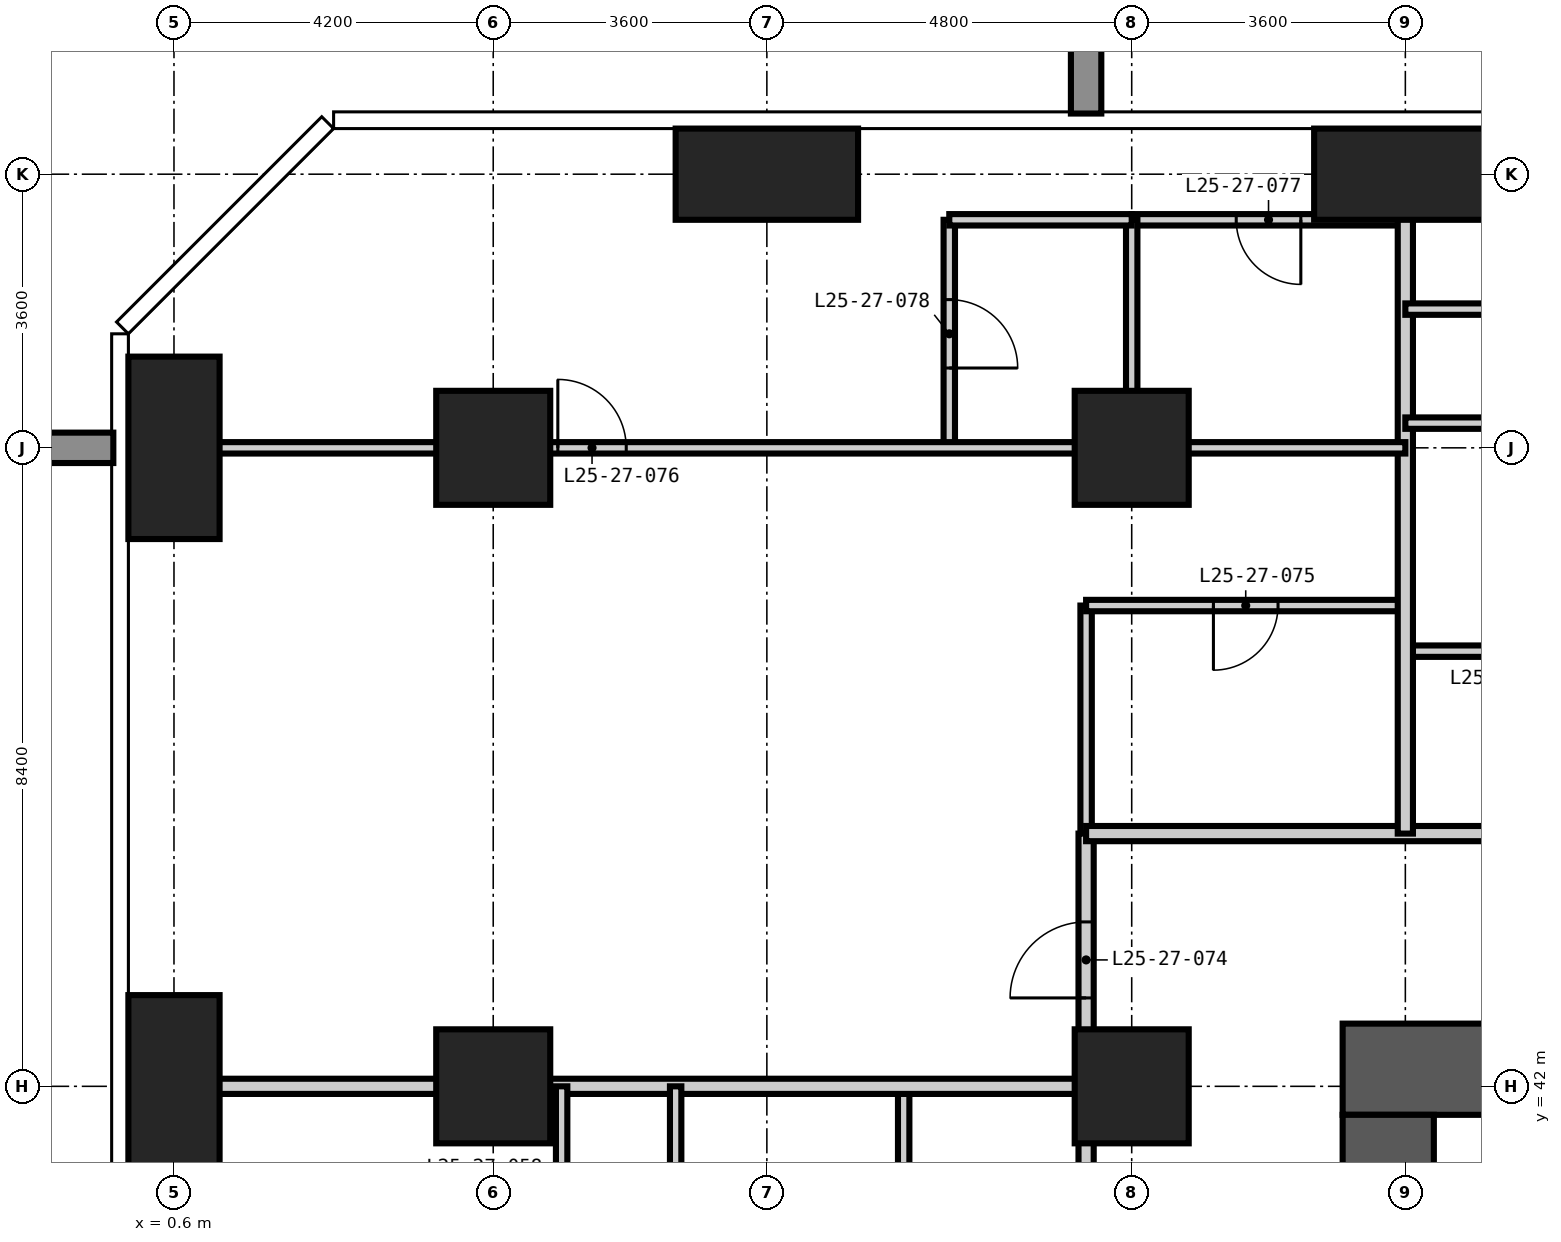
"""IFC4 building model, lengths in metres.
Left out: names, types, materials, properties, quantities, classifications, styles, units other than length and angle.
Written with IfcOpenShell. Run it as: python <this file> out.ifc"""

import sys

from ifc_helpers import new_model, si_unit, direction, frame, frame_2d, origin, origin_2d, place, context, subcontext, project, spatial, rectangle, extrude, element, fill, save


model = new_model("IFC4")
c1 = context("Model", 3, precision=1e-05, world=origin(), true_north=direction((0.0, 1.0)))
c2 = subcontext(c1, "Body", "Model", "MODEL_VIEW")
j1 = project(units=[si_unit("LENGTHUNIT", "METRE"), si_unit("PLANEANGLEUNIT", "RADIAN")], contexts=[c1])
p1 = place(None, origin())
s1 = spatial("IfcSite", under=j1, at=p1, CompositionType="ELEMENT")
p2 = place(p1, origin())
s2 = spatial("IfcBuilding", under=s1, at=p2, CompositionType="ELEMENT")
p3 = place(p2, frame((0.0, 0.0, 100.8)))
s3 = spatial("IfcBuildingStorey", under=s2, at=p3, CompositionType="ELEMENT", Elevation=100.8)
for number, where, z_axis, x_axis in (
    (1, (0.6, 42.0, -0.35), (0.0, 0.0, 1.0), (1.0, 0.0, 0.0)),
    (2, (0.6, 50.4, -0.35), (0.0, 0.0, 1.0), (1.0, 0.0, 0.0)),
):
    element("IfcColumn", number, at=place(p3, frame(where, z_axis=z_axis, x_axis=x_axis)), inside=s3, PredefinedType="COLUMN", context=c2, shape_type="SweptSolid", body=[
        extrude(rectangle(XDim=1.2, YDim=2.4, at=origin_2d()), origin(), (0.0, 0.0, 1.0), 3.6),
    ])
for number, where, z_axis, x_axis in (
    (3, (4.8, 42.0, -0.35), (0.0, 0.0, 1.0), (1.0, 0.0, 0.0)),
    (4, (4.8, 50.4, -0.35), (0.0, 0.0, 1.0), (1.0, 0.0, 0.0)),
):
    element("IfcColumn", number, at=place(p3, frame(where, z_axis=z_axis, x_axis=x_axis)), inside=s3, PredefinedType="COLUMN", context=c2, shape_type="SweptSolid", body=[
        extrude(rectangle(XDim=1.5, YDim=1.5, at=origin_2d()), origin(), (0.0, 0.0, 1.0), 3.6),
    ])
p4 = place(p3, frame((8.4, 54.0, -0.35), z_axis=(0.0, 0.0, 1.0), x_axis=(1.0, 0.0, 0.0)))
e5 = element("IfcColumn", 5, at=p4, inside=s3, PredefinedType="COLUMN", context=c2, shape_type="SweptSolid", body=[
    extrude(rectangle(XDim=2.4, YDim=1.2, at=origin_2d()), origin(), (0.0, 0.0, 1.0), 3.6),
])
for number, where, z_axis, x_axis in (
    (6, (13.2, 42.0, -0.35), (0.0, 0.0, 1.0), (1.0, 0.0, 0.0)),
    (7, (13.2, 50.4, -0.35), (0.0, 0.0, 1.0), (1.0, 0.0, 0.0)),
):
    element("IfcColumn", number, at=place(p3, frame(where, z_axis=z_axis, x_axis=x_axis)), inside=s3, PredefinedType="COLUMN", context=c2, shape_type="SweptSolid", body=[
        extrude(rectangle(XDim=1.5, YDim=1.5, at=origin_2d()), origin(), (0.0, 0.0, 1.0), 3.6),
    ])
p5 = place(p3, frame((16.8, 54.0, -0.35), z_axis=(0.0, 0.0, 1.0), x_axis=(1.0, 0.0, 0.0)))
e8 = element("IfcColumn", 8, at=p5, inside=s3, PredefinedType="COLUMN", context=c2, shape_type="SweptSolid", body=[
    extrude(rectangle(XDim=2.4, YDim=1.2, at=origin_2d()), origin(), (0.0, 0.0, 1.0), 3.6),
])
p6 = place(p3, frame((42.825, 42.225, -0.35), z_axis=(0.0, 0.0, 1.0), x_axis=(-1.0, 0.0, 0.0)))
e9 = element("IfcWall", 9, at=p6, inside=s3, PredefinedType="SHEAR", context=c2, shape_type="SweptSolid", body=[
    extrude(rectangle(XDim=26.85, YDim=1.2, at=frame_2d((13.425, 0.0))), origin(), (0.0, 0.0, 1.0), 3.6),
])
p7 = place(p6, frame((21.325, 0.0, 0.35)))
e10 = element("IfcOpeningElement", 10, at=p7, cuts=e9, PredefinedType="OPENING", context=c2, shape_type="SweptSolid", body=[
    extrude(rectangle(XDim=1.0, YDim=2.1, at=frame_2d((0.5, 1.05))), frame((0.0, 0.61, 0.0), z_axis=(0.0, -1.0, 0.0), x_axis=(1.0, 0.0, 0.0)), (0.0, 0.0, 1.0), 1.22),
])
p8 = place(p6, frame((10.725, 0.0, 0.35)))
e11 = element("IfcOpeningElement", 11, at=p8, cuts=e9, PredefinedType="OPENING", context=c2, shape_type="SweptSolid", body=[
    extrude(rectangle(XDim=1.2, YDim=2.2, at=frame_2d((0.6, 1.1))), frame((0.0, 0.61, 0.0), z_axis=(0.0, -1.0, 0.0), x_axis=(1.0, 0.0, 0.0)), (0.0, 0.0, 1.0), 1.22),
])
p9 = place(p3, frame((16.575, 41.625, -0.35), z_axis=(0.0, 0.0, 1.0), x_axis=(0.0, -1.0, 0.0)))
e12 = element("IfcWall", 12, at=p9, inside=s3, PredefinedType="SHEAR", context=c2, shape_type="SweptSolid", body=[
    extrude(rectangle(XDim=24.45, YDim=1.2, at=frame_2d((12.225, 0.0))), origin(), (0.0, 0.0, 1.0), 3.6),
])
p10 = place(p9, frame((11.325, 0.0, 0.35)))
e13 = element("IfcOpeningElement", 13, at=p10, cuts=e12, PredefinedType="OPENING", context=c2, shape_type="SweptSolid", body=[
    extrude(rectangle(XDim=1.8, YDim=2.2, at=frame_2d((0.9, 1.1))), frame((0.0, 0.61, 0.0), z_axis=(0.0, -1.0, 0.0), x_axis=(1.0, 0.0, 0.0)), (0.0, 0.0, 1.0), 1.22),
])
p11 = place(p9, frame((20.125, 0.0, 0.35)))
e14 = element("IfcOpeningElement", 14, at=p11, cuts=e12, PredefinedType="OPENING", context=c2, shape_type="SweptSolid", body=[
    extrude(rectangle(XDim=1.0, YDim=2.1, at=frame_2d((0.5, 1.05))), frame((0.0, 0.61, 0.0), z_axis=(0.0, -1.0, 0.0), x_axis=(1.0, 0.0, 0.0)), (0.0, 0.0, 1.0), 1.22),
])
p12 = place(p9, frame((5.425, 0.0, 0.35)))
e15 = element("IfcOpeningElement", 15, at=p12, cuts=e12, PredefinedType="OPENING", context=c2, shape_type="SweptSolid", body=[
    extrude(rectangle(XDim=1.0, YDim=2.1, at=frame_2d((0.5, 1.05))), frame((0.0, 0.61, 0.0), z_axis=(0.0, -1.0, 0.0), x_axis=(1.0, 0.0, 0.0)), (0.0, 0.0, 1.0), 1.22),
])
p13 = place(p3, frame((10.2, 39.0, 0.0), z_axis=(0.0, 0.0, 1.0), x_axis=(0.0, 1.0, 0.0)))
e16 = element("IfcWall", 16, at=p13, inside=s3, PredefinedType="PARTITIONING", context=c2, shape_type="SweptSolid", body=[
    extrude(rectangle(XDim=3.0, YDim=0.15, at=frame_2d((1.5, 0.0))), origin(), (0.0, 0.0, 1.0), 3.25),
])
p14 = place(p13, frame((1.075, 0.0, 0.0)))
e17 = element("IfcOpeningElement", 17, at=p14, cuts=e16, PredefinedType="OPENING", context=c2, shape_type="SweptSolid", body=[
    extrude(rectangle(XDim=0.85, YDim=2.1, at=frame_2d((0.425, 1.05))), frame((0.0, 0.085, 0.0), z_axis=(0.0, -1.0, 0.0), x_axis=(1.0, 0.0, 0.0)), (0.0, 0.0, 1.0), 0.17),
])
p15 = place(p3, frame((12.6, 45.325, 0.0), z_axis=(0.0, 0.0, 1.0), x_axis=(0.0, 1.0, 0.0)))
e18 = element("IfcWall", 18, at=p15, inside=s3, PredefinedType="PARTITIONING", context=c2, shape_type="SweptSolid", body=[
    extrude(rectangle(XDim=3.0, YDim=0.15, at=frame_2d((1.5, 0.0))), origin(), (0.0, 0.0, 1.0), 3.25),
])
p16 = place(p3, frame((16.8, 47.725, 0.0), z_axis=(0.0, 0.0, 1.0), x_axis=(1.0, 0.0, 0.0)))
e19 = element("IfcWall", 19, at=p16, inside=s3, PredefinedType="PARTITIONING", context=c2, shape_type="SweptSolid", body=[
    extrude(rectangle(XDim=3.0, YDim=0.15, at=frame_2d((1.5, 0.0))), origin(), (0.0, 0.0, 1.0), 3.25),
])
p17 = place(p16, frame((1.075, 0.0, 0.0)))
e20 = element("IfcOpeningElement", 20, at=p17, cuts=e19, PredefinedType="OPENING", context=c2, shape_type="SweptSolid", body=[
    extrude(rectangle(XDim=0.85, YDim=2.1, at=frame_2d((0.425, 1.05))), frame((0.0, 0.085, 0.0), z_axis=(0.0, -1.0, 0.0), x_axis=(1.0, 0.0, 0.0)), (0.0, 0.0, 1.0), 0.17),
])
p18 = place(p3, frame((12.6, 48.325, 0.0), z_axis=(0.0, 0.0, 1.0), x_axis=(1.0, 0.0, 0.0)))
e21 = element("IfcWall", 21, at=p18, inside=s3, PredefinedType="PARTITIONING", context=c2, shape_type="SweptSolid", body=[
    extrude(rectangle(XDim=4.2, YDim=0.15, at=frame_2d((2.1, 0.0))), origin(), (0.0, 0.0, 1.0), 3.25),
])
p19 = place(p18, frame((1.675, 0.0, 0.0)))
e22 = element("IfcOpeningElement", 22, at=p19, cuts=e21, PredefinedType="OPENING", context=c2, shape_type="SweptSolid", body=[
    extrude(rectangle(XDim=0.85, YDim=2.1, at=frame_2d((0.425, 1.05))), frame((0.0, 0.085, 0.0), z_axis=(0.0, -1.0, 0.0), x_axis=(1.0, 0.0, 0.0)), (0.0, 0.0, 1.0), 0.17),
])
p20 = place(p3, frame((13.2, 53.4, 0.0), z_axis=(0.0, 0.0, 1.0), x_axis=(1.0, 0.0, 0.0)))
e23 = element("IfcWall", 23, at=p20, inside=s3, PredefinedType="PARTITIONING", context=c2, shape_type="SweptSolid", body=[
    extrude(rectangle(XDim=3.6, YDim=0.15, at=frame_2d((1.8, 0.0))), origin(), (0.0, 0.0, 1.0), 3.25),
])
p21 = place(p20, frame((1.375, 0.0, 0.0)))
e24 = element("IfcOpeningElement", 24, at=p21, cuts=e23, PredefinedType="OPENING", context=c2, shape_type="SweptSolid", body=[
    extrude(rectangle(XDim=0.85, YDim=2.1, at=frame_2d((0.425, 1.05))), frame((0.0, 0.085, 0.0), z_axis=(0.0, -1.0, 0.0), x_axis=(1.0, 0.0, 0.0)), (0.0, 0.0, 1.0), 0.17),
])
p22 = place(p3, frame((12.6, 14.075, 0.0), z_axis=(0.0, 0.0, 1.0), x_axis=(0.0, 1.0, 0.0)))
e25 = element("IfcWall", 25, at=p22, inside=s3, PredefinedType="PARTITIONING", context=c2, shape_type="SweptSolid", body=[
    extrude(rectangle(XDim=31.25, YDim=0.2, at=frame_2d((15.625, 0.0))), origin(), (0.0, 0.0, 1.0), 3.25),
])
p23 = place(p22, frame((5.225, 0.0, 0.0)))
e26 = element("IfcOpeningElement", 26, at=p23, cuts=e25, PredefinedType="OPENING", context=c2, shape_type="SweptSolid", body=[
    extrude(rectangle(XDim=1.0, YDim=2.2, at=frame_2d((0.5, 1.1))), frame((0.0, 0.11, 0.0), z_axis=(0.0, -1.0, 0.0), x_axis=(1.0, 0.0, 0.0)), (0.0, 0.0, 1.0), 0.22),
])
p24 = place(p22, frame((13.625, 0.0, 0.0)))
e27 = element("IfcOpeningElement", 27, at=p24, cuts=e25, PredefinedType="OPENING", context=c2, shape_type="SweptSolid", body=[
    extrude(rectangle(XDim=1.0, YDim=2.2, at=frame_2d((0.5, 1.1))), frame((0.0, 0.11, 0.0), z_axis=(0.0, -1.0, 0.0), x_axis=(1.0, 0.0, 0.0)), (0.0, 0.0, 1.0), 0.22),
])
p25 = place(p22, frame((22.025, 0.0, 0.0)))
e28 = element("IfcOpeningElement", 28, at=p25, cuts=e25, PredefinedType="OPENING", context=c2, shape_type="SweptSolid", body=[
    extrude(rectangle(XDim=1.0, YDim=2.2, at=frame_2d((0.5, 1.1))), frame((0.0, 0.11, 0.0), z_axis=(0.0, -1.0, 0.0), x_axis=(1.0, 0.0, 0.0)), (0.0, 0.0, 1.0), 0.22),
])
p26 = place(p22, frame((0.863, 0.0, 0.0)))
e29 = element("IfcOpeningElement", 29, at=p26, cuts=e25, PredefinedType="OPENING", context=c2, shape_type="SweptSolid", body=[
    extrude(rectangle(XDim=1.0, YDim=2.2, at=frame_2d((0.5, 1.1))), frame((0.0, 0.11, 0.0), z_axis=(0.0, -1.0, 0.0), x_axis=(1.0, 0.0, 0.0)), (0.0, 0.0, 1.0), 0.22),
])
p27 = place(p22, frame((29.088, 0.0, 0.0)))
e30 = element("IfcOpeningElement", 30, at=p27, cuts=e25, PredefinedType="OPENING", context=c2, shape_type="SweptSolid", body=[
    extrude(rectangle(XDim=1.0, YDim=2.2, at=frame_2d((0.5, 1.1))), frame((0.0, 0.11, 0.0), z_axis=(0.0, -1.0, 0.0), x_axis=(1.0, 0.0, 0.0)), (0.0, 0.0, 1.0), 0.22),
])
p28 = place(p3, frame((12.6, 45.325, 0.0), z_axis=(0.0, 0.0, 1.0), x_axis=(1.0, 0.0, 0.0)))
e31 = element("IfcWall", 31, at=p28, inside=s3, PredefinedType="PARTITIONING", context=c2, shape_type="SweptSolid", body=[
    extrude(rectangle(XDim=33.325, YDim=0.2, at=frame_2d((16.663, 0.0))), origin(), (0.0, 0.0, 1.0), 3.25),
])
p29 = place(p28, frame((7.9, 0.0, 0.0)))
e32 = element("IfcOpeningElement", 32, at=p29, cuts=e31, PredefinedType="OPENING", context=c2, shape_type="SweptSolid", body=[
    extrude(rectangle(XDim=1.0, YDim=2.2, at=frame_2d((0.5, 1.1))), frame((0.0, 0.11, 0.0), z_axis=(0.0, -1.0, 0.0), x_axis=(1.0, 0.0, 0.0)), (0.0, 0.0, 1.0), 0.22),
])
p30 = place(p28, frame((16.3, 0.0, 0.0)))
e33 = element("IfcOpeningElement", 33, at=p30, cuts=e31, PredefinedType="OPENING", context=c2, shape_type="SweptSolid", body=[
    extrude(rectangle(XDim=1.0, YDim=2.2, at=frame_2d((0.5, 1.1))), frame((0.0, 0.11, 0.0), z_axis=(0.0, -1.0, 0.0), x_axis=(1.0, 0.0, 0.0)), (0.0, 0.0, 1.0), 0.22),
])
p31 = place(p28, frame((24.7, 0.0, 0.0)))
e34 = element("IfcOpeningElement", 34, at=p31, cuts=e31, PredefinedType="OPENING", context=c2, shape_type="SweptSolid", body=[
    extrude(rectangle(XDim=1.0, YDim=2.2, at=frame_2d((0.5, 1.1))), frame((0.0, 0.11, 0.0), z_axis=(0.0, -1.0, 0.0), x_axis=(1.0, 0.0, 0.0)), (0.0, 0.0, 1.0), 0.22),
])
p32 = place(p3, frame((16.8, 45.325, 0.0), z_axis=(0.0, 0.0, 1.0), x_axis=(0.0, 1.0, 0.0)))
e35 = element("IfcWall", 35, at=p32, inside=s3, PredefinedType="PARTITIONING", context=c2, shape_type="SweptSolid", body=[
    extrude(rectangle(XDim=9.293, YDim=0.2, at=frame_2d((4.646, 0.0))), origin(), (0.0, 0.0, 1.0), 3.25),
])
p33 = place(p3, frame((-0.018, 42.0, 0.0), z_axis=(0.0, 0.0, 1.0), x_axis=(1.0, 0.0, 0.0)))
e36 = element("IfcWall", 36, at=p33, inside=s3, PredefinedType="PARTITIONING", context=c2, shape_type="SweptSolid", body=[
    extrude(rectangle(XDim=12.618, YDim=0.2, at=frame_2d((6.309, 0.0))), origin(), (0.0, 0.0, 1.0), 3.25),
])
p34 = place(p3, frame((5.7, 39.0, 0.0), z_axis=(0.0, 0.0, 1.0), x_axis=(0.0, 1.0, 0.0)))
e37 = element("IfcWall", 37, at=p34, inside=s3, PredefinedType="PARTITIONING", context=c2, shape_type="SweptSolid", body=[
    extrude(rectangle(XDim=3.0, YDim=0.15, at=frame_2d((1.5, 0.0))), origin(), (0.0, 0.0, 1.0), 3.25),
])
p35 = place(p34, frame((1.05, 0.0, 0.0)))
e38 = element("IfcOpeningElement", 38, at=p35, cuts=e37, PredefinedType="OPENING", context=c2, shape_type="SweptSolid", body=[
    extrude(rectangle(XDim=0.9, YDim=2.1, at=frame_2d((0.45, 1.05))), frame((0.0, 0.085, 0.0), z_axis=(0.0, -1.0, 0.0), x_axis=(1.0, 0.0, 0.0)), (0.0, 0.0, 1.0), 0.17),
])
p36 = place(p3, frame((7.2, 39.0, 0.0), z_axis=(0.0, 0.0, 1.0), x_axis=(0.0, 1.0, 0.0)))
e39 = element("IfcWall", 39, at=p36, inside=s3, PredefinedType="PARTITIONING", context=c2, shape_type="SweptSolid", body=[
    extrude(rectangle(XDim=3.0, YDim=0.15, at=frame_2d((1.5, 0.0))), origin(), (0.0, 0.0, 1.0), 3.25),
])
p37 = place(p3, frame((10.8, 50.4, 0.0), z_axis=(0.0, 0.0, 1.0), x_axis=(0.0, 1.0, 0.0)))
e40 = element("IfcWall", 40, at=p37, inside=s3, PredefinedType="PARTITIONING", context=c2, shape_type="SweptSolid", body=[
    extrude(rectangle(XDim=3.0, YDim=0.15, at=frame_2d((1.5, 0.0))), origin(), (0.0, 0.0, 1.0), 3.25),
])
p38 = place(p37, frame((1.05, 0.0, 0.0)))
e41 = element("IfcOpeningElement", 41, at=p38, cuts=e40, PredefinedType="OPENING", context=c2, shape_type="SweptSolid", body=[
    extrude(rectangle(XDim=0.9, YDim=2.1, at=frame_2d((0.45, 1.05))), frame((0.0, 0.085, 0.0), z_axis=(0.0, -1.0, 0.0), x_axis=(1.0, 0.0, 0.0)), (0.0, 0.0, 1.0), 0.17),
])
p39 = place(p3, frame((13.2, 50.4, 0.0), z_axis=(0.0, 0.0, 1.0), x_axis=(0.0, 1.0, 0.0)))
e42 = element("IfcWall", 42, at=p39, inside=s3, PredefinedType="PARTITIONING", context=c2, shape_type="SweptSolid", body=[
    extrude(rectangle(XDim=3.0, YDim=0.15, at=frame_2d((1.5, 0.0))), origin(), (0.0, 0.0, 1.0), 3.25),
])
p40 = place(p3, frame((-0.018, 50.4, 0.0), z_axis=(0.0, 0.0, 1.0), x_axis=(1.0, 0.0, 0.0)))
e43 = element("IfcWall", 43, at=p40, inside=s3, PredefinedType="PARTITIONING", context=c2, shape_type="SweptSolid", body=[
    extrude(rectangle(XDim=16.818, YDim=0.15, at=frame_2d((8.409, 0.0))), origin(), (0.0, 0.0, 1.0), 3.25),
])
p41 = place(p40, frame((5.668, 0.0, 0.0)))
e44 = element("IfcOpeningElement", 44, at=p41, cuts=e43, PredefinedType="OPENING", context=c2, shape_type="SweptSolid", body=[
    extrude(rectangle(XDim=0.9, YDim=2.1, at=frame_2d((0.45, 1.05))), frame((0.0, 0.085, 0.0), z_axis=(0.0, -1.0, 0.0), x_axis=(1.0, 0.0, 0.0)), (0.0, 0.0, 1.0), 0.17),
])
p42 = place(p3, frame((16.8, 50.725, 0.0), z_axis=(0.0, 0.0, 1.0), x_axis=(1.0, 0.0, 0.0)))
e45 = element("IfcWall", 45, at=p42, inside=s3, PredefinedType="PARTITIONING", context=c2, shape_type="SweptSolid", body=[
    extrude(rectangle(XDim=3.0, YDim=0.15, at=frame_2d((1.5, 0.0))), origin(), (0.0, 0.0, 1.0), 3.25),
])
p43 = place(p3, frame((16.8, 52.225, 0.0), z_axis=(0.0, 0.0, 1.0), x_axis=(1.0, 0.0, 0.0)))
e46 = element("IfcWall", 46, at=p43, inside=s3, PredefinedType="PARTITIONING", context=c2, shape_type="SweptSolid", body=[
    extrude(rectangle(XDim=3.0, YDim=0.15, at=frame_2d((1.5, 0.0))), origin(), (0.0, 0.0, 1.0), 3.25),
])
p44 = place(p43, frame((1.25, 0.0, 0.0)))
e47 = element("IfcOpeningElement", 47, at=p44, cuts=e46, PredefinedType="OPENING", context=c2, shape_type="SweptSolid", body=[
    extrude(rectangle(XDim=0.9, YDim=2.1, at=frame_2d((0.45, 1.05))), frame((0.0, 0.085, 0.0), z_axis=(0.0, -1.0, 0.0), x_axis=(1.0, 0.0, 0.0)), (0.0, 0.0, 1.0), 0.17),
])
p45 = place(p3, frame((10.8, 53.4, 0.0), z_axis=(0.0, 0.0, 1.0), x_axis=(1.0, 0.0, 0.0)))
e48 = element("IfcWall", 48, at=p45, inside=s3, PredefinedType="PARTITIONING", context=c2, shape_type="SweptSolid", body=[
    extrude(rectangle(XDim=2.4, YDim=0.15, at=frame_2d((1.2, 0.0))), origin(), (0.0, 0.0, 1.0), 3.25),
])
p46 = place(p27, origin())
e49 = element("IfcDoor", 49, at=p46, inside=s3, OperationType="SINGLE_SWING_LEFT", PredefinedType="DOOR", context=c2, shape_type="SweptSolid", body=[
    extrude(rectangle(XDim=1.0, YDim=2.2, at=frame_2d((0.5, 1.1))), frame((0.0, 0.025, 0.0), z_axis=(0.0, -1.0, 0.0), x_axis=(1.0, 0.0, 0.0)), (0.0, 0.0, 1.0), 0.05),
])
fill(e30, e49)
p47 = place(p19, frame((0.85, 0.0, 0.0), z_axis=(0.0, 0.0, 1.0), x_axis=(-1.0, 0.0, 0.0)))
e50 = element("IfcDoor", 50, at=p47, inside=s3, OperationType="SINGLE_SWING_RIGHT", PredefinedType="DOOR", context=c2, shape_type="SweptSolid", body=[
    extrude(rectangle(XDim=0.85, YDim=2.1, at=frame_2d((0.425, 1.05))), frame((0.0, 0.025, 0.0), z_axis=(0.0, -1.0, 0.0), x_axis=(1.0, 0.0, 0.0)), (0.0, 0.0, 1.0), 0.05),
])
fill(e22, e50)
p48 = place(p41, origin())
e51 = element("IfcDoor", 51, at=p48, inside=s3, OperationType="SINGLE_SWING_LEFT", PredefinedType="DOOR", context=c2, shape_type="SweptSolid", body=[
    extrude(rectangle(XDim=0.9, YDim=2.1, at=frame_2d((0.45, 1.05))), frame((0.0, 0.025, 0.0), z_axis=(0.0, -1.0, 0.0), x_axis=(1.0, 0.0, 0.0)), (0.0, 0.0, 1.0), 0.05),
])
fill(e44, e51)
p49 = place(p21, frame((0.85, 0.0, 0.0), z_axis=(0.0, 0.0, 1.0), x_axis=(-1.0, 0.0, 0.0)))
e52 = element("IfcDoor", 52, at=p49, inside=s3, OperationType="SINGLE_SWING_LEFT", PredefinedType="DOOR", context=c2, shape_type="SweptSolid", body=[
    extrude(rectangle(XDim=0.85, YDim=2.1, at=frame_2d((0.425, 1.05))), frame((0.0, 0.025, 0.0), z_axis=(0.0, -1.0, 0.0), x_axis=(1.0, 0.0, 0.0)), (0.0, 0.0, 1.0), 0.05),
])
fill(e24, e52)
p50 = place(p38, frame((0.9, 0.0, 0.0), z_axis=(0.0, 0.0, 1.0), x_axis=(-1.0, 0.0, 0.0)))
e53 = element("IfcDoor", 53, at=p50, inside=s3, OperationType="SINGLE_SWING_RIGHT", PredefinedType="DOOR", context=c2, shape_type="SweptSolid", body=[
    extrude(rectangle(XDim=0.9, YDim=2.1, at=frame_2d((0.45, 1.05))), frame((0.0, 0.025, 0.0), z_axis=(0.0, -1.0, 0.0), x_axis=(1.0, 0.0, 0.0)), (0.0, 0.0, 1.0), 0.05),
])
fill(e41, e53)
save(model, sys.argv[1])
